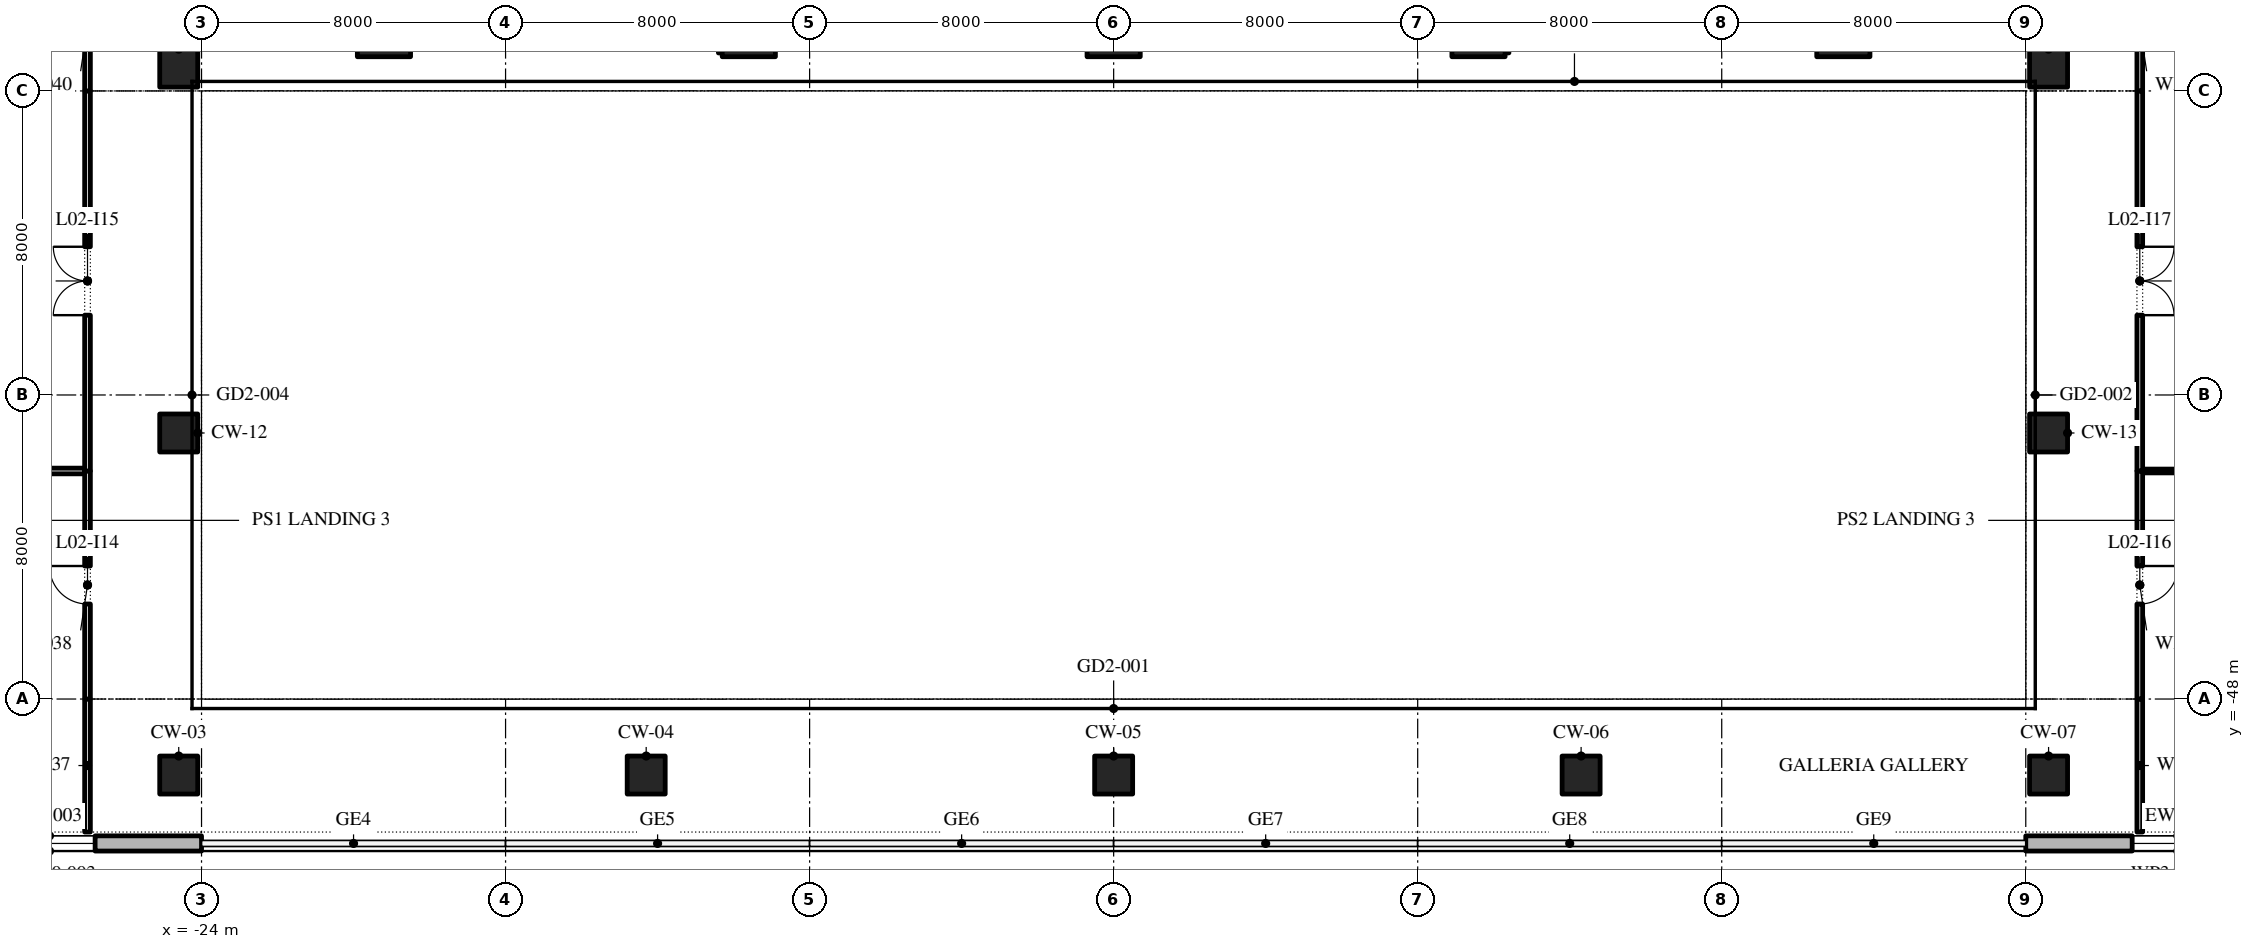
"""IFC4 building model, lengths in metres.
Left out: names, types, materials, properties, quantities, classifications, styles, units other than length and angle.
Written with IfcOpenShell. Run it as: python <this file> out.ifc"""

import sys

from ifc_helpers import new_model, si_unit, direction, frame, frame_2d, origin, origin_2d, place, context, subcontext, project, spatial, polyline, rectangle, outline, extrude, element, fill, save


model = new_model("IFC4")
c1 = context("Model", 3, precision=1e-05, world=origin(), true_north=direction((0.0, 1.0)))
c2 = subcontext(c1, "Body", "Model", "MODEL_VIEW")
j1 = project(units=[si_unit("LENGTHUNIT", "METRE"), si_unit("PLANEANGLEUNIT", "RADIAN")], contexts=[c1])
p1 = place(None, origin())
s1 = spatial("IfcSite", under=j1, at=p1, CompositionType="ELEMENT")
p2 = place(p1, origin())
s2 = spatial("IfcBuilding", under=s1, at=p2, CompositionType="ELEMENT")
p3 = place(p2, frame((0.0, 0.0, 14.0)))
s3 = spatial("IfcBuildingStorey", under=s2, at=p3, CompositionType="ELEMENT", Elevation=14.0)
for number, where, z_axis, x_axis in (
    (1, (-24.6, -50.0, 0.0), (0.0, 0.0, 1.0), (1.0, 0.0, 0.0)),
    (2, (-12.3, -50.0, 0.0), (0.0, 0.0, 1.0), (1.0, 0.0, 0.0)),
    (3, (0.0, -50.0, 0.0), (0.0, 0.0, 1.0), (1.0, 0.0, 0.0)),
    (4, (12.3, -50.0, 0.0), (0.0, 0.0, 1.0), (1.0, 0.0, 0.0)),
    (5, (24.6, -50.0, 0.0), (0.0, 0.0, 1.0), (1.0, 0.0, 0.0)),
    (6, (-24.6, -41.0, 0.0), (0.0, 0.0, 1.0), (1.0, 0.0, 0.0)),
    (7, (24.6, -41.0, 0.0), (0.0, 0.0, 1.0), (1.0, 0.0, 0.0)),
    (8, (-24.6, -31.4, 0.0), (0.0, 0.0, 1.0), (1.0, 0.0, 0.0)),
    (9, (24.6, -31.4, 0.0), (0.0, 0.0, 1.0), (1.0, 0.0, 0.0)),
):
    element("IfcColumn", number, at=place(p3, frame(where, z_axis=z_axis, x_axis=x_axis)), inside=s3, PredefinedType="COLUMN", context=c2, shape_type="SweptSolid", body=[
        extrude(rectangle(XDim=1.0, YDim=1.0, at=origin_2d()), origin(), (0.0, 0.0, 1.0), 5.2),
    ])
for number, where, z_axis, x_axis in (
    (10, (-19.2, -30.4, 0.0), (0.0, 0.0, 1.0), (1.0, 0.0, 0.0)),
    (11, (-9.6, -30.4, 0.0), (0.0, 0.0, 1.0), (1.0, 0.0, 0.0)),
    (12, (0.0, -30.4, 0.0), (0.0, 0.0, 1.0), (1.0, 0.0, 0.0)),
    (13, (9.6, -30.4, 0.0), (0.0, 0.0, 1.0), (1.0, 0.0, 0.0)),
    (14, (19.2, -30.4, 0.0), (0.0, 0.0, 1.0), (1.0, 0.0, 0.0)),
):
    element("IfcColumn", number, at=place(p3, frame(where, z_axis=z_axis, x_axis=x_axis)), inside=s3, PredefinedType="COLUMN", context=c2, shape_type="SweptSolid", body=[
        extrude(rectangle(XDim=1.4, YDim=1.4, at=origin_2d()), origin(), (0.0, 0.0, 1.0), 5.2),
    ])
p4 = place(p3, frame((-32.0, -51.8, 0.0), z_axis=(0.0, 0.0, 1.0), x_axis=(1.0, 0.0, 0.0)))
e15 = element("IfcWall", 15, at=p4, inside=s3, PredefinedType="STANDARD", context=c2, shape_type="SweptSolid", body=[
    extrude(rectangle(XDim=8.0, YDim=0.4, at=frame_2d((4.0, 0.0))), origin(), (0.0, 0.0, 1.0), 4.9),
])
p5 = place(p4, frame((2.8, 0.0, 0.9)))
e16 = element("IfcOpeningElement", 16, at=p5, cuts=e15, PredefinedType="OPENING", context=c2, shape_type="SweptSolid", body=[
    extrude(outline(polyline([(0.0, 0.0), (2.4, 0.0), (2.4, 1.7), (2.379, 1.976), (2.315, 2.246), (2.212, 2.502), (2.07, 2.74), (1.893, 2.954), (1.686, 3.137), (1.453, 3.287), (1.2, 3.4), (0.947, 3.287), (0.714, 3.137), (0.507, 2.954), (0.33, 2.74), (0.188, 2.502), (0.084, 2.246), (0.021, 1.976), (0.0, 1.7), (0.0, 0.0)])), frame((0.0, 0.21, 0.0), z_axis=(0.0, -1.0, 0.0), x_axis=(1.0, 0.0, 0.0)), (0.0, 0.0, 1.0), 0.42),
])
p6 = place(p3, frame((24.0, -51.8, 0.0), z_axis=(0.0, 0.0, 1.0), x_axis=(1.0, 0.0, 0.0)))
e17 = element("IfcWall", 17, at=p6, inside=s3, PredefinedType="STANDARD", context=c2, shape_type="SweptSolid", body=[
    extrude(rectangle(XDim=8.0, YDim=0.4, at=frame_2d((4.0, 0.0))), origin(), (0.0, 0.0, 1.0), 4.9),
])
p7 = place(p6, frame((2.8, 0.0, 0.9)))
e18 = element("IfcOpeningElement", 18, at=p7, cuts=e17, PredefinedType="OPENING", context=c2, shape_type="SweptSolid", body=[
    extrude(outline(polyline([(0.0, 0.0), (2.4, 0.0), (2.4, 1.7), (2.379, 1.976), (2.315, 2.246), (2.212, 2.502), (2.07, 2.74), (1.893, 2.954), (1.686, 3.137), (1.453, 3.287), (1.2, 3.4), (0.947, 3.287), (0.714, 3.137), (0.507, 2.954), (0.33, 2.74), (0.188, 2.502), (0.084, 2.246), (0.021, 1.976), (0.0, 1.7), (0.0, 0.0)])), frame((0.0, 0.21, 0.0), z_axis=(0.0, -1.0, 0.0), x_axis=(1.0, 0.0, 0.0)), (0.0, 0.0, 1.0), 0.42),
])
p8 = place(p3, frame((-35.0, -42.0, 0.0), z_axis=(0.0, 0.0, 1.0), x_axis=(1.0, 0.0, 0.0)))
e19 = element("IfcWall", 19, at=p8, inside=s3, PredefinedType="PARTITIONING", context=c2, shape_type="SweptSolid", body=[
    extrude(rectangle(XDim=7.925, YDim=0.15, at=frame_2d((3.962, 0.0))), origin(), (0.0, 0.0, 1.0), 4.9),
])
p9 = place(p3, frame((27.075, -42.0, 0.0), z_axis=(0.0, 0.0, 1.0), x_axis=(1.0, 0.0, 0.0)))
e20 = element("IfcWall", 20, at=p9, inside=s3, PredefinedType="PARTITIONING", context=c2, shape_type="SweptSolid", body=[
    extrude(rectangle(XDim=7.925, YDim=0.1, at=frame_2d((3.962, 0.0))), origin(), (0.0, 0.0, 1.0), 4.9),
])
p10 = place(p3, frame((-27.0, -51.5, 0.0), z_axis=(0.0, 0.0, 1.0), x_axis=(0.0, 1.0, 0.0)))
e21 = element("IfcWall", 21, at=p10, inside=s3, PredefinedType="PARTITIONING", context=c2, shape_type="SweptSolid", body=[
    extrude(rectangle(XDim=3.5, YDim=0.15, at=frame_2d((1.75, 0.0))), origin(), (0.0, 0.0, 1.0), 4.9),
])
p11 = place(p3, frame((-27.0, -48.0, 0.0), z_axis=(0.0, 0.0, 1.0), x_axis=(0.0, 1.0, 0.0)))
e22 = element("IfcWall", 22, at=p11, inside=s3, PredefinedType="PARTITIONING", context=c2, shape_type="SweptSolid", body=[
    extrude(rectangle(XDim=6.0, YDim=0.15, at=frame_2d((3.0, 0.0))), origin(), (0.0, 0.0, 1.0), 4.9),
])
p12 = place(p11, frame((2.5, 0.0, 0.0)))
e23 = element("IfcOpeningElement", 23, at=p12, cuts=e22, PredefinedType="OPENING", context=c2, shape_type="SweptSolid", body=[
    extrude(rectangle(XDim=1.0, YDim=2.1, at=frame_2d((0.5, 1.05))), frame((0.0, 0.085, 0.0), z_axis=(0.0, -1.0, 0.0), x_axis=(1.0, 0.0, 0.0)), (0.0, 0.0, 1.0), 0.17),
])
p13 = place(p3, frame((-27.0, -42.0, 0.0), z_axis=(0.0, 0.0, 1.0), x_axis=(0.0, 1.0, 0.0)))
e24 = element("IfcWall", 24, at=p13, inside=s3, PredefinedType="PARTITIONING", context=c2, shape_type="SweptSolid", body=[
    extrude(rectangle(XDim=10.0, YDim=0.15, at=frame_2d((5.0, 0.0))), origin(), (0.0, 0.0, 1.0), 4.9),
])
p14 = place(p13, frame((4.1, 0.0, 0.0)))
e25 = element("IfcOpeningElement", 25, at=p14, cuts=e24, PredefinedType="OPENING", context=c2, shape_type="SweptSolid", body=[
    extrude(rectangle(XDim=1.8, YDim=2.1, at=frame_2d((0.9, 1.05))), frame((0.0, 0.085, 0.0), z_axis=(0.0, -1.0, 0.0), x_axis=(1.0, 0.0, 0.0)), (0.0, 0.0, 1.0), 0.17),
])
p15 = place(p3, frame((-27.0, -32.0, 0.0), z_axis=(0.0, 0.0, 1.0), x_axis=(0.0, 1.0, 0.0)))
e26 = element("IfcWall", 26, at=p15, inside=s3, PredefinedType="PARTITIONING", context=c2, shape_type="SweptSolid", body=[
    extrude(rectangle(XDim=3.425, YDim=0.15, at=frame_2d((1.712, 0.0))), origin(), (0.0, 0.0, 1.0), 4.9),
])
p16 = place(p3, frame((27.0, -51.5, 0.0), z_axis=(0.0, 0.0, 1.0), x_axis=(0.0, 1.0, 0.0)))
e27 = element("IfcWall", 27, at=p16, inside=s3, PredefinedType="PARTITIONING", context=c2, shape_type="SweptSolid", body=[
    extrude(rectangle(XDim=3.5, YDim=0.15, at=frame_2d((1.75, 0.0))), origin(), (0.0, 0.0, 1.0), 4.9),
])
p17 = place(p3, frame((27.0, -48.0, 0.0), z_axis=(0.0, 0.0, 1.0), x_axis=(0.0, 1.0, 0.0)))
e28 = element("IfcWall", 28, at=p17, inside=s3, PredefinedType="PARTITIONING", context=c2, shape_type="SweptSolid", body=[
    extrude(rectangle(XDim=6.0, YDim=0.15, at=frame_2d((3.0, 0.0))), origin(), (0.0, 0.0, 1.0), 4.9),
])
p18 = place(p17, frame((2.5, 0.0, 0.0)))
e29 = element("IfcOpeningElement", 29, at=p18, cuts=e28, PredefinedType="OPENING", context=c2, shape_type="SweptSolid", body=[
    extrude(rectangle(XDim=1.0, YDim=2.1, at=frame_2d((0.5, 1.05))), frame((0.0, 0.085, 0.0), z_axis=(0.0, -1.0, 0.0), x_axis=(1.0, 0.0, 0.0)), (0.0, 0.0, 1.0), 0.17),
])
p19 = place(p3, frame((27.0, -42.0, 0.0), z_axis=(0.0, 0.0, 1.0), x_axis=(0.0, 1.0, 0.0)))
e30 = element("IfcWall", 30, at=p19, inside=s3, PredefinedType="PARTITIONING", context=c2, shape_type="SweptSolid", body=[
    extrude(rectangle(XDim=10.0, YDim=0.15, at=frame_2d((5.0, 0.0))), origin(), (0.0, 0.0, 1.0), 4.9),
])
p20 = place(p19, frame((4.1, 0.0, 0.0)))
e31 = element("IfcOpeningElement", 31, at=p20, cuts=e30, PredefinedType="OPENING", context=c2, shape_type="SweptSolid", body=[
    extrude(rectangle(XDim=1.8, YDim=2.1, at=frame_2d((0.9, 1.05))), frame((0.0, 0.085, 0.0), z_axis=(0.0, -1.0, 0.0), x_axis=(1.0, 0.0, 0.0)), (0.0, 0.0, 1.0), 0.17),
])
p21 = place(p3, frame((27.0, -32.0, 0.0), z_axis=(0.0, 0.0, 1.0), x_axis=(0.0, 1.0, 0.0)))
e32 = element("IfcWall", 32, at=p21, inside=s3, PredefinedType="PARTITIONING", context=c2, shape_type="SweptSolid", body=[
    extrude(rectangle(XDim=3.425, YDim=0.15, at=frame_2d((1.712, 0.0))), origin(), (0.0, 0.0, 1.0), 4.9),
])
p22 = place(p5, origin())
e33 = element("IfcWindow", 33, at=p22, inside=s3, PartitioningType="DOUBLE_PANEL_VERTICAL", PredefinedType="WINDOW", context=c2, shape_type="SweptSolid", body=[
    extrude(outline(polyline([(0.0, 0.0), (2.4, 0.0), (2.4, 1.7), (2.379, 1.976), (2.315, 2.246), (2.212, 2.502), (2.07, 2.74), (1.893, 2.954), (1.686, 3.137), (1.453, 3.287), (1.2, 3.4), (0.947, 3.287), (0.714, 3.137), (0.507, 2.954), (0.33, 2.74), (0.188, 2.502), (0.084, 2.246), (0.021, 1.976), (0.0, 1.7), (0.0, 0.0)])), frame((0.0, 0.03, 0.0), z_axis=(0.0, -1.0, 0.0), x_axis=(1.0, 0.0, 0.0)), (0.0, 0.0, 1.0), 0.06),
])
fill(e16, e33)
p23 = place(p7, origin())
e34 = element("IfcWindow", 34, at=p23, inside=s3, PartitioningType="DOUBLE_PANEL_VERTICAL", PredefinedType="WINDOW", context=c2, shape_type="SweptSolid", body=[
    extrude(outline(polyline([(0.0, 0.0), (2.4, 0.0), (2.4, 1.7), (2.379, 1.976), (2.315, 2.246), (2.212, 2.502), (2.07, 2.74), (1.893, 2.954), (1.686, 3.137), (1.453, 3.287), (1.2, 3.4), (0.947, 3.287), (0.714, 3.137), (0.507, 2.954), (0.33, 2.74), (0.188, 2.502), (0.084, 2.246), (0.021, 1.976), (0.0, 1.7), (0.0, 0.0)])), frame((0.0, 0.03, 0.0), z_axis=(0.0, -1.0, 0.0), x_axis=(1.0, 0.0, 0.0)), (0.0, 0.0, 1.0), 0.06),
])
fill(e18, e34)
p24 = place(p12, origin())
e35 = element("IfcDoor", 35, at=p24, inside=s3, OperationType="SINGLE_SWING_LEFT", PredefinedType="DOOR", context=c2, shape_type="SweptSolid", body=[
    extrude(rectangle(XDim=1.0, YDim=2.1, at=frame_2d((0.5, 1.05))), frame((0.0, 0.025, 0.0), z_axis=(0.0, -1.0, 0.0), x_axis=(1.0, 0.0, 0.0)), (0.0, 0.0, 1.0), 0.05),
])
fill(e23, e35)
p25 = place(p14, origin())
e36 = element("IfcDoor", 36, at=p25, inside=s3, OperationType="SINGLE_SWING_LEFT", PredefinedType="DOOR", context=c2, shape_type="SweptSolid", body=[
    extrude(rectangle(XDim=1.8, YDim=2.1, at=frame_2d((0.9, 1.05))), frame((0.0, 0.025, 0.0), z_axis=(0.0, -1.0, 0.0), x_axis=(1.0, 0.0, 0.0)), (0.0, 0.0, 1.0), 0.05),
])
fill(e25, e36)
p26 = place(p18, frame((1.0, 0.0, 0.0), z_axis=(0.0, 0.0, 1.0), x_axis=(-1.0, 0.0, 0.0)))
e37 = element("IfcDoor", 37, at=p26, inside=s3, OperationType="SINGLE_SWING_RIGHT", PredefinedType="DOOR", context=c2, shape_type="SweptSolid", body=[
    extrude(rectangle(XDim=1.0, YDim=2.1, at=frame_2d((0.5, 1.05))), frame((0.0, 0.025, 0.0), z_axis=(0.0, -1.0, 0.0), x_axis=(1.0, 0.0, 0.0)), (0.0, 0.0, 1.0), 0.05),
])
fill(e29, e37)
p27 = place(p20, frame((1.8, 0.0, 0.0), z_axis=(0.0, 0.0, 1.0), x_axis=(-1.0, 0.0, 0.0)))
e38 = element("IfcDoor", 38, at=p27, inside=s3, OperationType="SINGLE_SWING_RIGHT", PredefinedType="DOOR", context=c2, shape_type="SweptSolid", body=[
    extrude(rectangle(XDim=1.8, YDim=2.1, at=frame_2d((0.9, 1.05))), frame((0.0, 0.025, 0.0), z_axis=(0.0, -1.0, 0.0), x_axis=(1.0, 0.0, 0.0)), (0.0, 0.0, 1.0), 0.05),
])
fill(e31, e38)
save(model, sys.argv[1])
